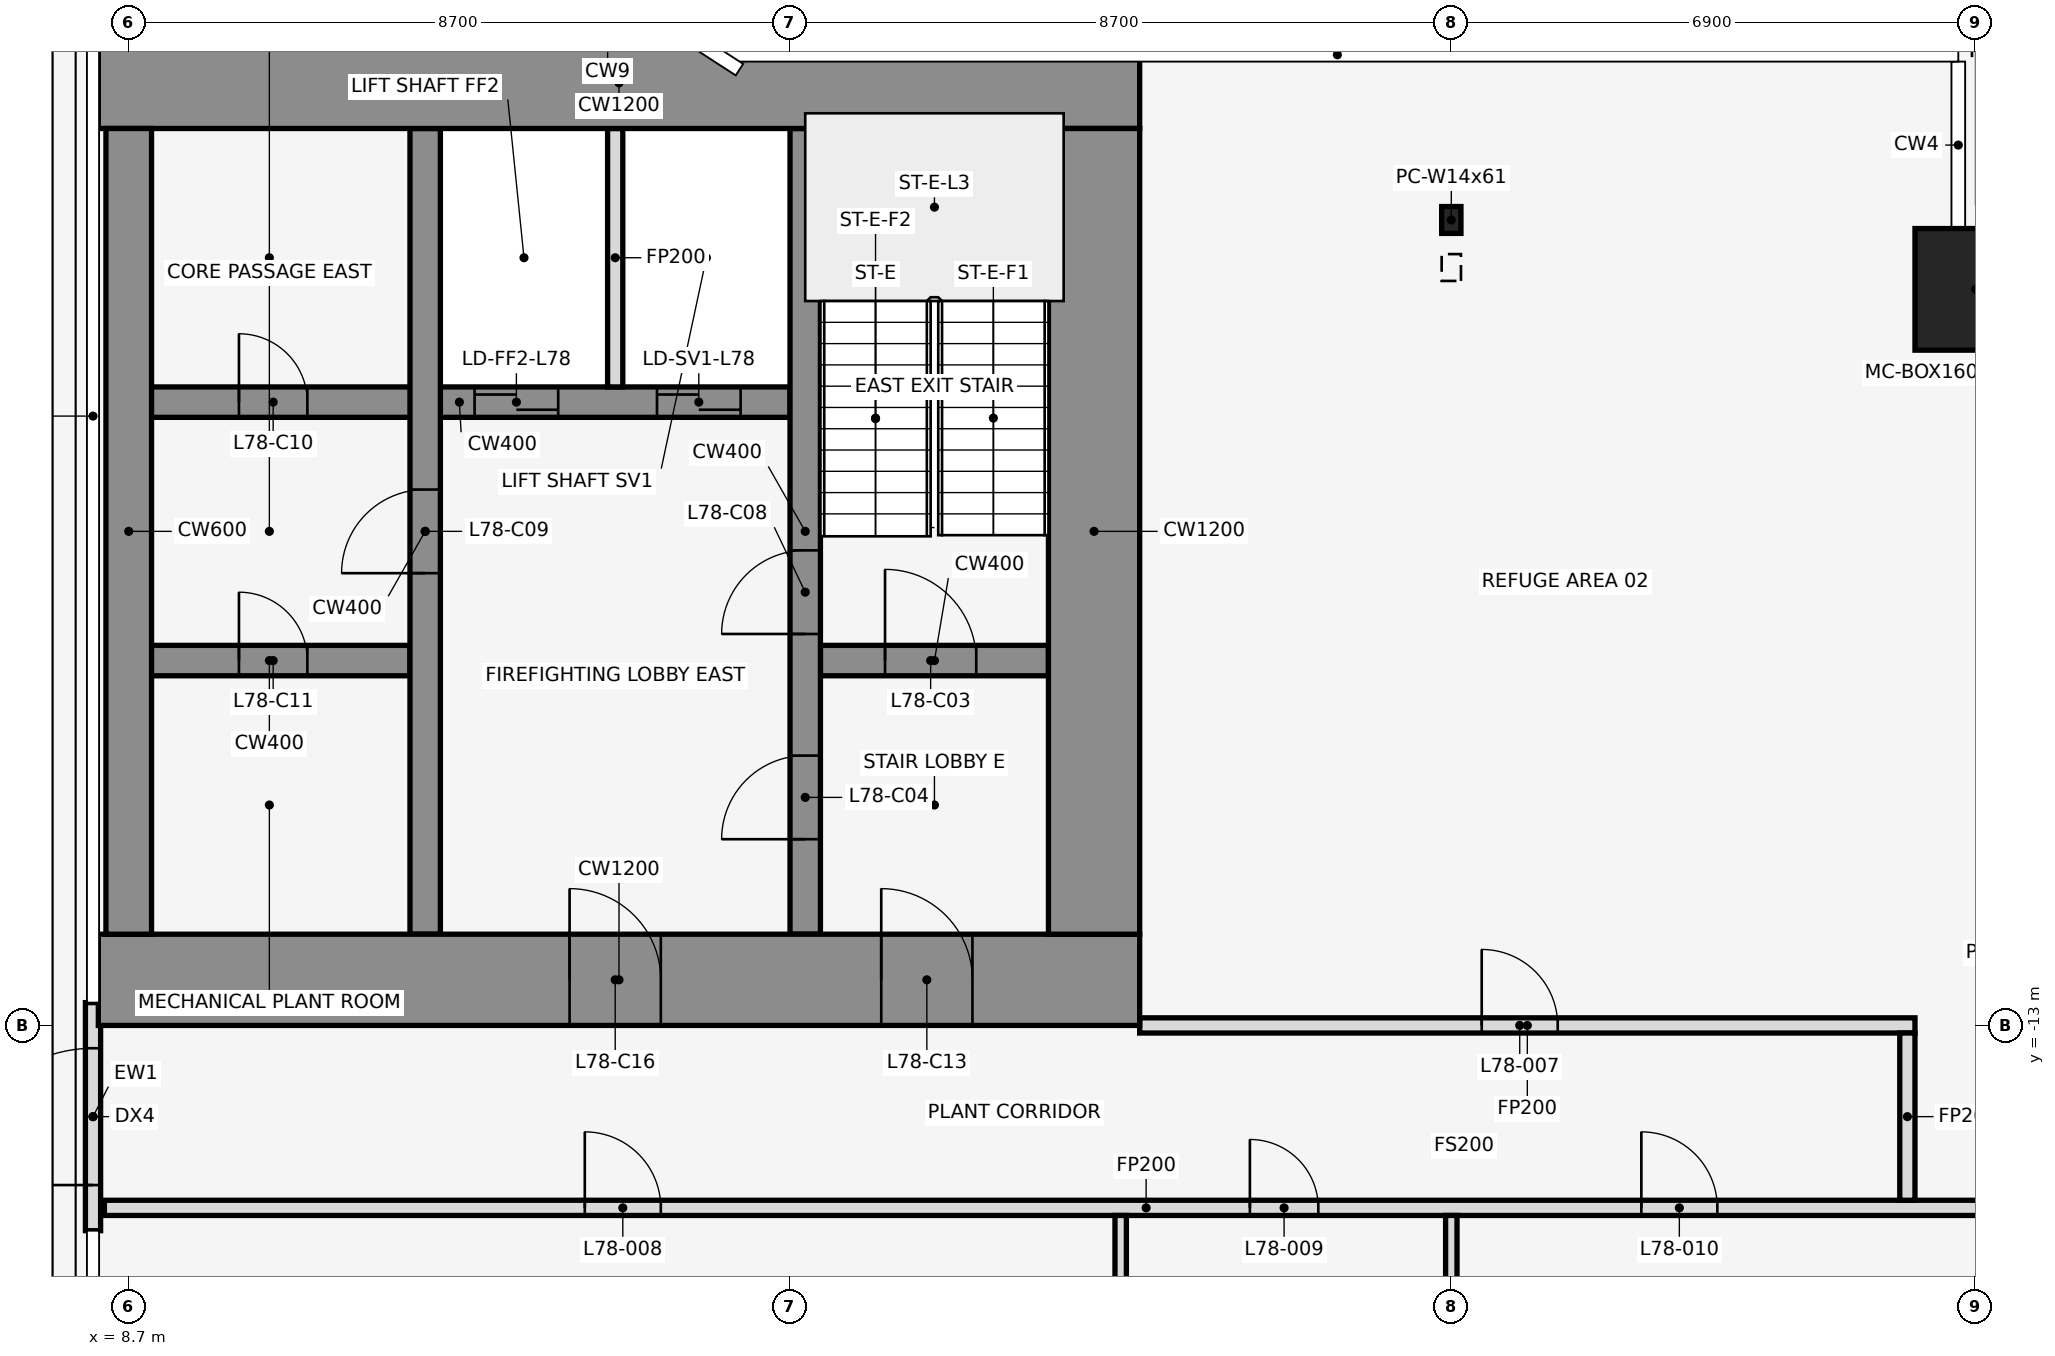
"""IFC4 building model, lengths in metres.
Left out: names, types, materials, properties, quantities, classifications, styles, units other than length and angle.
Written with IfcOpenShell. Run it as: python <this file> out.ifc"""

import sys

from ifc_helpers import new_model, si_unit, direction, frame, frame_2d, origin, origin_2d, place, context, subcontext, project, spatial, rectangle, hollow_rectangle, i_section, extrude, element, fill, save


model = new_model("IFC4")
c1 = context("Model", 3, precision=1e-05, world=origin(), true_north=direction((0.0, 1.0)))
c2 = subcontext(c1, "Body", "Model", "MODEL_VIEW")
j1 = project(units=[si_unit("LENGTHUNIT", "METRE"), si_unit("PLANEANGLEUNIT", "RADIAN")], contexts=[c1])
p1 = place(None, origin())
s1 = spatial("IfcSite", under=j1, at=p1, CompositionType="ELEMENT")
p2 = place(p1, origin())
s2 = spatial("IfcBuilding", under=s1, at=p2, CompositionType="ELEMENT")
p3 = place(p2, frame((0.0, 0.0, 347.9)))
s3 = spatial("IfcBuildingStorey", under=s2, at=p3, CompositionType="ELEMENT", Elevation=347.9)
p4 = place(p3, frame((26.1, -2.403, 0.024), z_axis=(0.0, -0.139200740592, 0.990264183851), x_axis=(1.0, 0.0, 0.0)))
e1 = element("IfcColumn", 1, at=p4, inside=s3, PredefinedType="COLUMN", context=c2, shape_type="SweptSolid", body=[
    extrude(i_section(OverallWidth=0.254, OverallDepth=0.353, WebThickness=0.01, FlangeThickness=0.016, at=origin_2d()), origin(), (0.0, 0.0, 1.0), 4.495),
])
p5 = place(p3, frame((33.0, -3.316, 0.0), z_axis=(0.0, 0.0, 1.0), x_axis=(1.0, 0.0, 0.0)))
e2 = element("IfcColumn", 2, at=p5, inside=s3, PredefinedType="COLUMN", context=c2, shape_type="SweptSolid", body=[
    extrude(hollow_rectangle(XDim=1.6, YDim=1.6, WallThickness=0.05, at=origin_2d()), origin(), (0.0, 0.0, 1.0), 4.5),
])
p6 = place(p3, frame((8.23, -15.7, 0.0), z_axis=(0.0, 0.0, 1.0), x_axis=(0.0, 1.0, 0.0)))
e3 = element("IfcWall", 3, at=p6, inside=s3, PredefinedType="STANDARD", context=c2, shape_type="SweptSolid", body=[
    extrude(rectangle(XDim=3.0, YDim=0.2, at=frame_2d((1.5, 0.0))), origin(), (0.0, 0.0, 1.0), 4.3),
])
p7 = place(p6, frame((0.6, 0.0, 0.0)))
e4 = element("IfcOpeningElement", 4, at=p7, cuts=e3, PredefinedType="OPENING", context=c2, shape_type="SweptSolid", body=[
    extrude(rectangle(XDim=1.8, YDim=2.4, at=frame_2d((0.9, 1.2))), frame((0.0, 0.112, 0.0), z_axis=(0.0, -1.0, 0.0), x_axis=(1.0, 0.0, 0.0)), (0.0, 0.0, 1.0), 0.224),
])
p8 = place(p3, frame((8.38, -15.4, 0.0), z_axis=(0.0, 0.0, 1.0), x_axis=(1.0, 0.0, 0.0)))
e5 = element("IfcWall", 5, at=p8, inside=s3, PredefinedType="PARTITIONING", context=c2, shape_type="SweptSolid", body=[
    extrude(rectangle(XDim=27.41, YDim=0.2, at=frame_2d((13.705, 0.0))), origin(), (0.0, 0.0, 1.0), 3.368),
])
p9 = place(p8, frame((6.32, 0.0, 0.0)))
e6 = element("IfcOpeningElement", 6, at=p9, cuts=e5, PredefinedType="OPENING", context=c2, shape_type="SweptSolid", body=[
    extrude(rectangle(XDim=1.0, YDim=2.1, at=frame_2d((0.5, 1.05))), frame((0.0, 0.112, 0.0), z_axis=(0.0, -1.0, 0.0), x_axis=(1.0, 0.0, 0.0)), (0.0, 0.0, 1.0), 0.224),
])
p10 = place(p8, frame((15.07, 0.0, 0.0)))
e7 = element("IfcOpeningElement", 7, at=p10, cuts=e5, PredefinedType="OPENING", context=c2, shape_type="SweptSolid", body=[
    extrude(rectangle(XDim=0.9, YDim=2.1, at=frame_2d((0.45, 1.05))), frame((0.0, 0.112, 0.0), z_axis=(0.0, -1.0, 0.0), x_axis=(1.0, 0.0, 0.0)), (0.0, 0.0, 1.0), 0.224),
])
p11 = place(p8, frame((20.22, 0.0, 0.0)))
e8 = element("IfcOpeningElement", 8, at=p11, cuts=e5, PredefinedType="OPENING", context=c2, shape_type="SweptSolid", body=[
    extrude(rectangle(XDim=1.0, YDim=2.1, at=frame_2d((0.5, 1.05))), frame((0.0, 0.112, 0.0), z_axis=(0.0, -1.0, 0.0), x_axis=(1.0, 0.0, 0.0)), (0.0, 0.0, 1.0), 0.224),
])
p12 = place(p3, frame((22.0, -13.0, 0.0), z_axis=(0.0, 0.0, 1.0), x_axis=(1.0, 0.0, 0.0)))
e9 = element("IfcWall", 9, at=p12, inside=s3, PredefinedType="PARTITIONING", context=c2, shape_type="SweptSolid", body=[
    extrude(rectangle(XDim=10.2, YDim=0.2, at=frame_2d((5.1, 0.0))), origin(), (0.0, 0.0, 1.0), 3.368),
])
p13 = place(p12, frame((4.5, 0.0, 0.0)))
e10 = element("IfcOpeningElement", 10, at=p13, cuts=e9, PredefinedType="OPENING", context=c2, shape_type="SweptSolid", body=[
    extrude(rectangle(XDim=1.0, YDim=2.1, at=frame_2d((0.5, 1.05))), frame((0.0, 0.112, 0.0), z_axis=(0.0, -1.0, 0.0), x_axis=(1.0, 0.0, 0.0)), (0.0, 0.0, 1.0), 0.224),
])
for number, where, z_axis, x_axis in (
    (11, (21.75, -24.22, 0.0), (0.0, 0.0, 1.0), (0.0, 1.0, 0.0)),
    (12, (26.1, -24.22, 0.0), (0.0, 0.0, 1.0), (0.0, 1.0, 0.0)),
):
    element("IfcWall", number, at=place(p3, frame(where, z_axis=z_axis, x_axis=x_axis)), inside=s3, PredefinedType="PARTITIONING", context=c2, shape_type="SweptSolid", body=[
        extrude(rectangle(XDim=8.72, YDim=0.15, at=frame_2d((4.36, 0.0))), origin(), (0.0, 0.0, 1.0), 3.368),
    ])
p14 = place(p3, frame((32.1, -15.3, 0.0), z_axis=(0.0, 0.0, 1.0), x_axis=(0.0, 1.0, 0.0)))
e13 = element("IfcWall", 13, at=p14, inside=s3, PredefinedType="PARTITIONING", context=c2, shape_type="SweptSolid", body=[
    extrude(rectangle(XDim=2.2, YDim=0.2, at=frame_2d((1.1, 0.0))), origin(), (0.0, 0.0, 1.0), 3.368),
])
p15 = place(p3, frame((8.7, -8.2, 0.0), z_axis=(0.0, 0.0, 1.0), x_axis=(1.0, 0.0, 0.0)))
e14 = element("IfcWall", 14, at=p15, inside=s3, PredefinedType="SHEAR", context=c2, shape_type="SweptSolid", body=[
    extrude(rectangle(XDim=3.7, YDim=0.4, at=frame_2d((1.85, 0.0))), origin(), (0.0, 0.0, 1.0), 4.5),
])
p16 = place(p15, frame((1.45, 0.0, 0.0)))
e15 = element("IfcOpeningElement", 15, at=p16, cuts=e14, PredefinedType="OPENING", context=c2, shape_type="SweptSolid", body=[
    extrude(rectangle(XDim=0.9, YDim=2.1, at=frame_2d((0.45, 1.05))), frame((0.0, 0.212, 0.0), z_axis=(0.0, -1.0, 0.0), x_axis=(1.0, 0.0, 0.0)), (0.0, 0.0, 1.0), 0.424),
])
p17 = place(p3, frame((17.8, -8.2, 0.0), z_axis=(0.0, 0.0, 1.0), x_axis=(1.0, 0.0, 0.0)))
e16 = element("IfcWall", 16, at=p17, inside=s3, PredefinedType="SHEAR", context=c2, shape_type="SweptSolid", body=[
    extrude(rectangle(XDim=3.0, YDim=0.4, at=frame_2d((1.5, 0.0))), origin(), (0.0, 0.0, 1.0), 4.5),
])
p18 = place(p17, frame((0.85, 0.0, 0.0)))
e17 = element("IfcOpeningElement", 17, at=p18, cuts=e16, PredefinedType="OPENING", context=c2, shape_type="SweptSolid", body=[
    extrude(rectangle(XDim=1.2, YDim=2.1, at=frame_2d((0.6, 1.05))), frame((0.0, 0.212, 0.0), z_axis=(0.0, -1.0, 0.0), x_axis=(1.0, 0.0, 0.0)), (0.0, 0.0, 1.0), 0.424),
])
p19 = place(p3, frame((8.7, -4.8, 0.0), z_axis=(0.0, 0.0, 1.0), x_axis=(1.0, 0.0, 0.0)))
e18 = element("IfcWall", 18, at=p19, inside=s3, PredefinedType="SHEAR", context=c2, shape_type="SweptSolid", body=[
    extrude(rectangle(XDim=8.7, YDim=0.4, at=frame_2d((4.35, 0.0))), origin(), (0.0, 0.0, 1.0), 4.5),
])
p20 = place(p19, frame((4.55, 0.0, 0.0)))
e19 = element("IfcOpeningElement", 19, at=p20, cuts=e18, PredefinedType="OPENING", context=c2, shape_type="SweptSolid", body=[
    extrude(rectangle(XDim=1.1, YDim=2.1, at=frame_2d((0.55, 1.05))), frame((0.0, 0.212, 0.0), z_axis=(0.0, -1.0, 0.0), x_axis=(1.0, 0.0, 0.0)), (0.0, 0.0, 1.0), 0.424),
])
p21 = place(p19, frame((6.95, 0.0, 0.0)))
e20 = element("IfcOpeningElement", 20, at=p21, cuts=e18, PredefinedType="OPENING", context=c2, shape_type="SweptSolid", body=[
    extrude(rectangle(XDim=1.1, YDim=2.1, at=frame_2d((0.55, 1.05))), frame((0.0, 0.212, 0.0), z_axis=(0.0, -1.0, 0.0), x_axis=(1.0, 0.0, 0.0)), (0.0, 0.0, 1.0), 0.424),
])
p22 = place(p19, frame((1.45, 0.0, 0.0)))
e21 = element("IfcOpeningElement", 21, at=p22, cuts=e18, PredefinedType="OPENING", context=c2, shape_type="SweptSolid", body=[
    extrude(rectangle(XDim=0.9, YDim=2.1, at=frame_2d((0.45, 1.05))), frame((0.0, 0.212, 0.0), z_axis=(0.0, -1.0, 0.0), x_axis=(1.0, 0.0, 0.0)), (0.0, 0.0, 1.0), 0.424),
])
p23 = place(p3, frame((12.6, -11.8, 0.0), z_axis=(0.0, 0.0, 1.0), x_axis=(0.0, 1.0, 0.0)))
e22 = element("IfcWall", 22, at=p23, inside=s3, PredefinedType="SHEAR", context=c2, shape_type="SweptSolid", body=[
    extrude(rectangle(XDim=10.6, YDim=0.4, at=frame_2d((5.3, 0.0))), origin(), (0.0, 0.0, 1.0), 4.5),
])
p24 = place(p23, frame((4.75, 0.0, 0.0)))
e23 = element("IfcOpeningElement", 23, at=p24, cuts=e22, PredefinedType="OPENING", context=c2, shape_type="SweptSolid", body=[
    extrude(rectangle(XDim=1.1, YDim=2.1, at=frame_2d((0.55, 1.05))), frame((0.0, 0.212, 0.0), z_axis=(0.0, -1.0, 0.0), x_axis=(1.0, 0.0, 0.0)), (0.0, 0.0, 1.0), 0.424),
])
p25 = place(p3, frame((15.1, -4.6, 0.0), z_axis=(0.0, 0.0, 1.0), x_axis=(0.0, 1.0, 0.0)))
e24 = element("IfcWall", 24, at=p25, inside=s3, PredefinedType="PARTITIONING", context=c2, shape_type="SweptSolid", body=[
    extrude(rectangle(XDim=3.4, YDim=0.2, at=frame_2d((1.7, 0.0))), origin(), (0.0, 0.0, 1.0), 3.368),
])
p26 = place(p3, frame((17.6, -11.8, 0.0), z_axis=(0.0, 0.0, 1.0), x_axis=(0.0, 1.0, 0.0)))
e25 = element("IfcWall", 25, at=p26, inside=s3, PredefinedType="SHEAR", context=c2, shape_type="SweptSolid", body=[
    extrude(rectangle(XDim=10.6, YDim=0.4, at=frame_2d((5.3, 0.0))), origin(), (0.0, 0.0, 1.0), 4.5),
])
p27 = place(p26, frame((1.25, 0.0, 0.0)))
e26 = element("IfcOpeningElement", 26, at=p27, cuts=e25, PredefinedType="OPENING", context=c2, shape_type="SweptSolid", body=[
    extrude(rectangle(XDim=1.1, YDim=2.1, at=frame_2d((0.55, 1.05))), frame((0.0, 0.212, 0.0), z_axis=(0.0, -1.0, 0.0), x_axis=(1.0, 0.0, 0.0)), (0.0, 0.0, 1.0), 0.424),
])
p28 = place(p26, frame((3.95, 0.0, 0.0)))
e27 = element("IfcOpeningElement", 27, at=p28, cuts=e25, PredefinedType="OPENING", context=c2, shape_type="SweptSolid", body=[
    extrude(rectangle(XDim=1.1, YDim=2.1, at=frame_2d((0.55, 1.05))), frame((0.0, 0.212, 0.0), z_axis=(0.0, -1.0, 0.0), x_axis=(1.0, 0.0, 0.0)), (0.0, 0.0, 1.0), 0.424),
])
p29 = place(p3, frame((8.3, -0.6, 0.0), z_axis=(0.0, 0.0, 1.0), x_axis=(1.0, 0.0, 0.0)))
e28 = element("IfcWall", 28, at=p29, inside=s3, PredefinedType="SHEAR", context=c2, shape_type="SweptSolid", body=[
    extrude(rectangle(XDim=13.7, YDim=1.2, at=frame_2d((6.85, 0.0))), origin(), (0.0, 0.0, 1.0), 4.5),
])
p30 = place(p3, frame((8.3, -12.4, 0.0), z_axis=(0.0, 0.0, 1.0), x_axis=(1.0, 0.0, 0.0)))
e29 = element("IfcWall", 29, at=p30, inside=s3, PredefinedType="SHEAR", context=c2, shape_type="SweptSolid", body=[
    extrude(rectangle(XDim=13.7, YDim=1.2, at=frame_2d((6.85, 0.0))), origin(), (0.0, 0.0, 1.0), 4.5),
])
p31 = place(p30, frame((10.3, 0.0, 0.0)))
e30 = element("IfcOpeningElement", 30, at=p31, cuts=e29, PredefinedType="OPENING", context=c2, shape_type="SweptSolid", body=[
    extrude(rectangle(XDim=1.2, YDim=2.1, at=frame_2d((0.6, 1.05))), frame((0.0, 0.612, 0.0), z_axis=(0.0, -1.0, 0.0), x_axis=(1.0, 0.0, 0.0)), (0.0, 0.0, 1.0), 1.224),
])
p32 = place(p30, frame((6.2, 0.0, 0.0)))
e31 = element("IfcOpeningElement", 31, at=p32, cuts=e29, PredefinedType="OPENING", context=c2, shape_type="SweptSolid", body=[
    extrude(rectangle(XDim=1.2, YDim=2.1, at=frame_2d((0.6, 1.05))), frame((0.0, 0.612, 0.0), z_axis=(0.0, -1.0, 0.0), x_axis=(1.0, 0.0, 0.0)), (0.0, 0.0, 1.0), 1.224),
])
p33 = place(p3, frame((21.4, -11.8, 0.0), z_axis=(0.0, 0.0, 1.0), x_axis=(0.0, 1.0, 0.0)))
e32 = element("IfcWall", 32, at=p33, inside=s3, PredefinedType="SHEAR", context=c2, shape_type="SweptSolid", body=[
    extrude(rectangle(XDim=10.6, YDim=1.2, at=frame_2d((5.3, 0.0))), origin(), (0.0, 0.0, 1.0), 4.5),
])
p34 = place(p3, frame((8.7, -11.8, 0.0), z_axis=(0.0, 0.0, 1.0), x_axis=(0.0, 1.0, 0.0)))
e33 = element("IfcWall", 33, at=p34, inside=s3, PredefinedType="SHEAR", context=c2, shape_type="SweptSolid", body=[
    extrude(rectangle(XDim=10.6, YDim=0.6, at=frame_2d((5.3, 0.0))), origin(), (0.0, 0.0, 1.0), 4.5),
])
p35 = place(p7, origin())
e34 = element("IfcDoor", 34, at=p35, inside=s3, OperationType="SINGLE_SWING_LEFT", PredefinedType="DOOR", context=c2, shape_type="SweptSolid", body=[
    extrude(rectangle(XDim=1.8, YDim=2.4, at=frame_2d((0.9, 1.2))), frame((0.0, 0.025, 0.0), z_axis=(0.0, -1.0, 0.0), x_axis=(1.0, 0.0, 0.0)), (0.0, 0.0, 1.0), 0.05),
])
fill(e4, e34)
p36 = place(p13, origin())
e35 = element("IfcDoor", 35, at=p36, inside=s3, OperationType="SINGLE_SWING_LEFT", PredefinedType="DOOR", context=c2, shape_type="SweptSolid", body=[
    extrude(rectangle(XDim=1.0, YDim=2.1, at=frame_2d((0.5, 1.05))), frame((0.0, 0.025, 0.0), z_axis=(0.0, -1.0, 0.0), x_axis=(1.0, 0.0, 0.0)), (0.0, 0.0, 1.0), 0.05),
])
fill(e10, e35)
p37 = place(p9, frame((1.0, 0.0, 0.0), z_axis=(0.0, 0.0, 1.0), x_axis=(-1.0, 0.0, 0.0)))
e36 = element("IfcDoor", 36, at=p37, inside=s3, OperationType="SINGLE_SWING_RIGHT", PredefinedType="DOOR", context=c2, shape_type="SweptSolid", body=[
    extrude(rectangle(XDim=1.0, YDim=2.1, at=frame_2d((0.5, 1.05))), frame((0.0, 0.025, 0.0), z_axis=(0.0, -1.0, 0.0), x_axis=(1.0, 0.0, 0.0)), (0.0, 0.0, 1.0), 0.05),
])
fill(e6, e36)
p38 = place(p10, frame((0.9, 0.0, 0.0), z_axis=(0.0, 0.0, 1.0), x_axis=(-1.0, 0.0, 0.0)))
e37 = element("IfcDoor", 37, at=p38, inside=s3, OperationType="SINGLE_SWING_RIGHT", PredefinedType="DOOR", context=c2, shape_type="SweptSolid", body=[
    extrude(rectangle(XDim=0.9, YDim=2.1, at=frame_2d((0.45, 1.05))), frame((0.0, 0.025, 0.0), z_axis=(0.0, -1.0, 0.0), x_axis=(1.0, 0.0, 0.0)), (0.0, 0.0, 1.0), 0.05),
])
fill(e7, e37)
p39 = place(p11, frame((1.0, 0.0, 0.0), z_axis=(0.0, 0.0, 1.0), x_axis=(-1.0, 0.0, 0.0)))
e38 = element("IfcDoor", 38, at=p39, inside=s3, OperationType="SINGLE_SWING_LEFT", PredefinedType="DOOR", context=c2, shape_type="SweptSolid", body=[
    extrude(rectangle(XDim=1.0, YDim=2.1, at=frame_2d((0.5, 1.05))), frame((0.0, 0.025, 0.0), z_axis=(0.0, -1.0, 0.0), x_axis=(1.0, 0.0, 0.0)), (0.0, 0.0, 1.0), 0.05),
])
fill(e8, e38)
p40 = place(p18, origin())
e39 = element("IfcDoor", 39, at=p40, inside=s3, OperationType="SINGLE_SWING_LEFT", PredefinedType="DOOR", context=c2, shape_type="SweptSolid", body=[
    extrude(rectangle(XDim=1.2, YDim=2.1, at=frame_2d((0.6, 1.05))), frame((0.0, 0.025, 0.0), z_axis=(0.0, -1.0, 0.0), x_axis=(1.0, 0.0, 0.0)), (0.0, 0.0, 1.0), 0.05),
])
fill(e17, e39)
p41 = place(p27, origin())
e40 = element("IfcDoor", 40, at=p41, inside=s3, OperationType="SINGLE_SWING_RIGHT", PredefinedType="DOOR", context=c2, shape_type="SweptSolid", body=[
    extrude(rectangle(XDim=1.1, YDim=2.1, at=frame_2d((0.55, 1.05))), frame((0.0, 0.025, 0.0), z_axis=(0.0, -1.0, 0.0), x_axis=(1.0, 0.0, 0.0)), (0.0, 0.0, 1.0), 0.05),
])
fill(e26, e40)
p42 = place(p20, origin())
e41 = element("IfcDoor", 41, at=p42, inside=s3, OperationType="DOUBLE_DOOR_SLIDING", PredefinedType="DOOR", context=c2, shape_type="SweptSolid", body=[
    extrude(rectangle(XDim=1.1, YDim=2.1, at=frame_2d((0.55, 1.05))), frame((0.0, 0.025, 0.0), z_axis=(0.0, -1.0, 0.0), x_axis=(1.0, 0.0, 0.0)), (0.0, 0.0, 1.0), 0.05),
])
fill(e19, e41)
p43 = place(p21, origin())
e42 = element("IfcDoor", 42, at=p43, inside=s3, OperationType="DOUBLE_DOOR_SLIDING", PredefinedType="DOOR", context=c2, shape_type="SweptSolid", body=[
    extrude(rectangle(XDim=1.1, YDim=2.1, at=frame_2d((0.55, 1.05))), frame((0.0, 0.025, 0.0), z_axis=(0.0, -1.0, 0.0), x_axis=(1.0, 0.0, 0.0)), (0.0, 0.0, 1.0), 0.05),
])
fill(e20, e42)
p44 = place(p28, origin())
e43 = element("IfcDoor", 43, at=p44, inside=s3, OperationType="SINGLE_SWING_RIGHT", PredefinedType="DOOR", context=c2, shape_type="SweptSolid", body=[
    extrude(rectangle(XDim=1.1, YDim=2.1, at=frame_2d((0.55, 1.05))), frame((0.0, 0.025, 0.0), z_axis=(0.0, -1.0, 0.0), x_axis=(1.0, 0.0, 0.0)), (0.0, 0.0, 1.0), 0.05),
])
fill(e27, e43)
p45 = place(p24, frame((1.1, 0.0, 0.0), z_axis=(0.0, 0.0, 1.0), x_axis=(-1.0, 0.0, 0.0)))
e44 = element("IfcDoor", 44, at=p45, inside=s3, OperationType="SINGLE_SWING_RIGHT", PredefinedType="DOOR", context=c2, shape_type="SweptSolid", body=[
    extrude(rectangle(XDim=1.1, YDim=2.1, at=frame_2d((0.55, 1.05))), frame((0.0, 0.025, 0.0), z_axis=(0.0, -1.0, 0.0), x_axis=(1.0, 0.0, 0.0)), (0.0, 0.0, 1.0), 0.05),
])
fill(e23, e44)
p46 = place(p22, origin())
e45 = element("IfcDoor", 45, at=p46, inside=s3, OperationType="SINGLE_SWING_RIGHT", PredefinedType="DOOR", context=c2, shape_type="SweptSolid", body=[
    extrude(rectangle(XDim=0.9, YDim=2.1, at=frame_2d((0.45, 1.05))), frame((0.0, 0.025, 0.0), z_axis=(0.0, -1.0, 0.0), x_axis=(1.0, 0.0, 0.0)), (0.0, 0.0, 1.0), 0.05),
])
fill(e21, e45)
p47 = place(p16, frame((0.9, 0.0, 0.0), z_axis=(0.0, 0.0, 1.0), x_axis=(-1.0, 0.0, 0.0)))
e46 = element("IfcDoor", 46, at=p47, inside=s3, OperationType="SINGLE_SWING_RIGHT", PredefinedType="DOOR", context=c2, shape_type="SweptSolid", body=[
    extrude(rectangle(XDim=0.9, YDim=2.1, at=frame_2d((0.45, 1.05))), frame((0.0, 0.025, 0.0), z_axis=(0.0, -1.0, 0.0), x_axis=(1.0, 0.0, 0.0)), (0.0, 0.0, 1.0), 0.05),
])
fill(e15, e46)
p48 = place(p31, frame((1.2, 0.0, 0.0), z_axis=(0.0, 0.0, 1.0), x_axis=(-1.0, 0.0, 0.0)))
e47 = element("IfcDoor", 47, at=p48, inside=s3, OperationType="SINGLE_SWING_RIGHT", PredefinedType="DOOR", context=c2, shape_type="SweptSolid", body=[
    extrude(rectangle(XDim=1.2, YDim=2.1, at=frame_2d((0.6, 1.05))), frame((0.0, 0.025, 0.0), z_axis=(0.0, -1.0, 0.0), x_axis=(1.0, 0.0, 0.0)), (0.0, 0.0, 1.0), 0.05),
])
fill(e30, e47)
p49 = place(p32, frame((1.2, 0.0, 0.0), z_axis=(0.0, 0.0, 1.0), x_axis=(-1.0, 0.0, 0.0)))
e48 = element("IfcDoor", 48, at=p49, inside=s3, OperationType="SINGLE_SWING_RIGHT", PredefinedType="DOOR", context=c2, shape_type="SweptSolid", body=[
    extrude(rectangle(XDim=1.2, YDim=2.1, at=frame_2d((0.6, 1.05))), frame((0.0, 0.025, 0.0), z_axis=(0.0, -1.0, 0.0), x_axis=(1.0, 0.0, 0.0)), (0.0, 0.0, 1.0), 0.05),
])
fill(e31, e48)
save(model, sys.argv[1])
